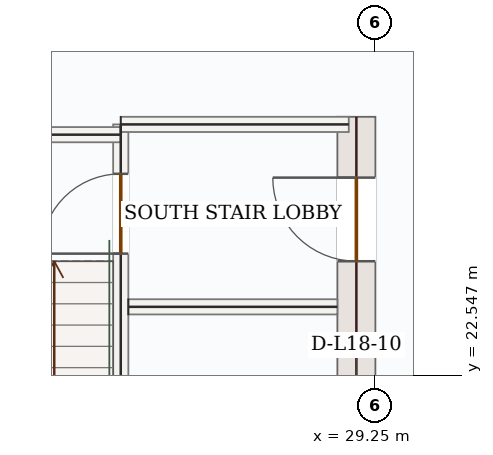
"""IFC4 building model, lengths in metres.
Left out: names, types, materials, properties, quantities, classifications, styles, units other than length and angle.
Written with IfcOpenShell. Run it as: python <this file> out.ifc"""

import sys

from ifc_helpers import new_model, si_unit, direction, frame, frame_2d, origin, place, context, subcontext, project, spatial, rectangle, extrude, source, transform, mapped, element, fill, save


model = new_model("IFC4")
c1 = context("Model", 3, precision=1e-05, world=origin(), true_north=direction((0.0, 1.0)))
c2 = subcontext(c1, "Body", "Model", "MODEL_VIEW")
j1 = project(units=[si_unit("LENGTHUNIT", "METRE"), si_unit("PLANEANGLEUNIT", "RADIAN")], contexts=[c1])
p1 = place(None, origin())
s1 = spatial("IfcSite", under=j1, at=p1, CompositionType="ELEMENT")
p2 = place(p1, origin())
s2 = spatial("IfcBuilding", under=s1, at=p2, CompositionType="ELEMENT")
p3 = place(p2, frame((0.0, 0.0, 83.7)))
s3 = spatial("IfcBuildingStorey", under=s2, at=p3, CompositionType="ELEMENT", Elevation=83.7)
p4 = place(p3, frame((29.0, 17.4, 0.0), z_axis=(0.0, 0.0, 1.0), x_axis=(0.0, 1.0, 0.0)))
e1 = element("IfcWall", 1, at=p4, inside=s3, PredefinedType="SHEAR", context=c2, shape_type="SweptSolid", body=[
    extrude(rectangle(XDim=8.55, YDim=0.5, at=frame_2d((4.275, 0.0))), origin(), (0.0, 0.0, 1.0), 3.95),
])
p5 = place(p4, frame((6.65, 0.0, 0.0)))
e2 = element("IfcOpeningElement", 2, at=p5, cuts=e1, PredefinedType="OPENING", context=c2, shape_type="SweptSolid", body=[
    extrude(rectangle(XDim=1.1, YDim=2.2, at=frame_2d((0.55, 1.1))), frame((0.0, 0.26, 0.0), z_axis=(0.0, -1.0, 0.0), x_axis=(1.0, 0.0, 0.0)), (0.0, 0.0, 1.0), 0.52),
])
p6 = place(p4, frame((2.15, 0.0, 0.0)))
e3 = element("IfcOpeningElement", 3, at=p6, cuts=e1, PredefinedType="OPENING", context=c2, shape_type="SweptSolid", body=[
    extrude(rectangle(XDim=0.88, YDim=2.1, at=frame_2d((0.44, 1.05))), frame((0.0, 0.26, 0.0), z_axis=(0.0, -1.0, 0.0), x_axis=(1.0, 0.0, 0.0)), (0.0, 0.0, 1.0), 0.52),
])
p7 = place(p4, frame((4.25, 0.0, 0.0)))
e4 = element("IfcOpeningElement", 4, at=p7, cuts=e1, PredefinedType="OPENING", context=c2, shape_type="SweptSolid", body=[
    extrude(rectangle(XDim=0.88, YDim=2.1, at=frame_2d((0.44, 1.05))), frame((0.0, 0.26, 0.0), z_axis=(0.0, -1.0, 0.0), x_axis=(1.0, 0.0, 0.0)), (0.0, 0.0, 1.0), 0.52),
])
p8 = place(p3, frame((25.9, 17.85, 0.0), z_axis=(0.0, 0.0, 1.0), x_axis=(0.0, 1.0, 0.0)))
e5 = element("IfcWall", 5, at=p8, inside=s3, PredefinedType="SOLIDWALL", context=c2, shape_type="SweptSolid", body=[
    extrude(rectangle(XDim=8.0, YDim=0.2, at=frame_2d((4.0, 0.0))), origin(), (0.0, 0.0, 1.0), 3.95),
])
p9 = place(p8, frame((6.3, 0.0, 0.0)))
e6 = element("IfcOpeningElement", 6, at=p9, cuts=e5, PredefinedType="OPENING", context=c2, shape_type="SweptSolid", body=[
    extrude(rectangle(XDim=1.05, YDim=2.15, at=frame_2d((0.525, 1.075))), frame((0.0, 0.11, 0.0), z_axis=(0.0, -1.0, 0.0), x_axis=(1.0, 0.0, 0.0)), (0.0, 0.0, 1.0), 0.22),
])
m1 = source(origin(), c2, "Body", "SweptSolid", [
    extrude(rectangle(XDim=4.25, YDim=0.2, at=frame_2d((2.125, 0.0))), origin(), (0.0, 0.0, 1.0), 3.95),
])
p10 = place(p3, frame((21.65, 25.715, 0.0), z_axis=(0.0, 0.0, 1.0), x_axis=(1.0, 0.0, 0.0)))
e7 = element("IfcWall", 7, at=p10, inside=s3, PredefinedType="SOLIDWALL", context=c2, shape_type="MappedRepresentation", body=[
    mapped(m1, transform((0.0, 0.0, 0.0), x_axis=(1.0, 0.0, 0.0), y_axis=(0.0, 1.0, 0.0), z_axis=(0.0, 0.0, 1.0), scale=1.0)),
])
m2 = source(origin(), c2, "Body", "SweptSolid", [
    extrude(rectangle(XDim=3.0, YDim=0.2, at=frame_2d((1.5, 0.0))), origin(), (0.0, 0.0, 1.0), 3.95),
])
p11 = place(p3, frame((25.9, 25.85, 0.0), z_axis=(0.0, 0.0, 1.0), x_axis=(1.0, 0.0, 0.0)))
e8 = element("IfcWall", 8, at=p11, inside=s3, PredefinedType="SOLIDWALL", context=c2, shape_type="MappedRepresentation", body=[
    mapped(m2, transform((0.0, 0.0, 0.0), x_axis=(1.0, 0.0, 0.0), y_axis=(0.0, 1.0, 0.0), z_axis=(0.0, 0.0, 1.0), scale=1.0)),
])
m3 = source(origin(), c2, "Body", "SweptSolid", [
    extrude(rectangle(XDim=2.75, YDim=0.2, at=frame_2d((1.375, 0.0))), origin(), (0.0, 0.0, 1.0), 3.95),
])
p12 = place(p3, frame((26.0, 23.45, 0.0), z_axis=(0.0, 0.0, 1.0), x_axis=(1.0, 0.0, 0.0)))
e9 = element("IfcWall", 9, at=p12, inside=s3, PredefinedType="SOLIDWALL", context=c2, shape_type="MappedRepresentation", body=[
    mapped(m3, transform((0.0, 0.0, 0.0), x_axis=(1.0, 0.0, 0.0), y_axis=(0.0, 1.0, 0.0), z_axis=(0.0, 0.0, 1.0), scale=1.0)),
])
m4 = source(origin(), c2, "Body", "SweptSolid", [
    extrude(rectangle(XDim=1.05, YDim=2.15, at=frame_2d((0.525, 1.075))), frame((0.0, 0.025, 0.0), z_axis=(0.0, -1.0, 0.0), x_axis=(1.0, 0.0, 0.0)), (0.0, 0.0, 1.0), 0.05),
])
p13 = place(p9, origin())
e10 = element("IfcDoor", 10, at=p13, inside=s3, OperationType="SINGLE_SWING_LEFT", PredefinedType="DOOR", context=c2, shape_type="MappedRepresentation", body=[
    mapped(m4, transform((0.0, 0.0, 0.0), x_axis=(1.0, 0.0, 0.0), y_axis=(0.0, 1.0, 0.0), z_axis=(0.0, 0.0, 1.0), scale=1.0)),
])
fill(e6, e10)
m5 = source(origin(), c2, "Body", "SweptSolid", [
    extrude(rectangle(XDim=1.1, YDim=2.2, at=frame_2d((0.55, 1.1))), frame((0.0, 0.025, 0.0), z_axis=(0.0, -1.0, 0.0), x_axis=(1.0, 0.0, 0.0)), (0.0, 0.0, 1.0), 0.05),
])
p14 = place(p5, origin())
e11 = element("IfcDoor", 11, at=p14, inside=s3, OperationType="SINGLE_SWING_RIGHT", PredefinedType="DOOR", context=c2, shape_type="MappedRepresentation", body=[
    mapped(m5, transform((0.0, 0.0, 0.0), x_axis=(1.0, 0.0, 0.0), y_axis=(0.0, 1.0, 0.0), z_axis=(0.0, 0.0, 1.0), scale=1.0)),
])
fill(e2, e11)
save(model, sys.argv[1])
